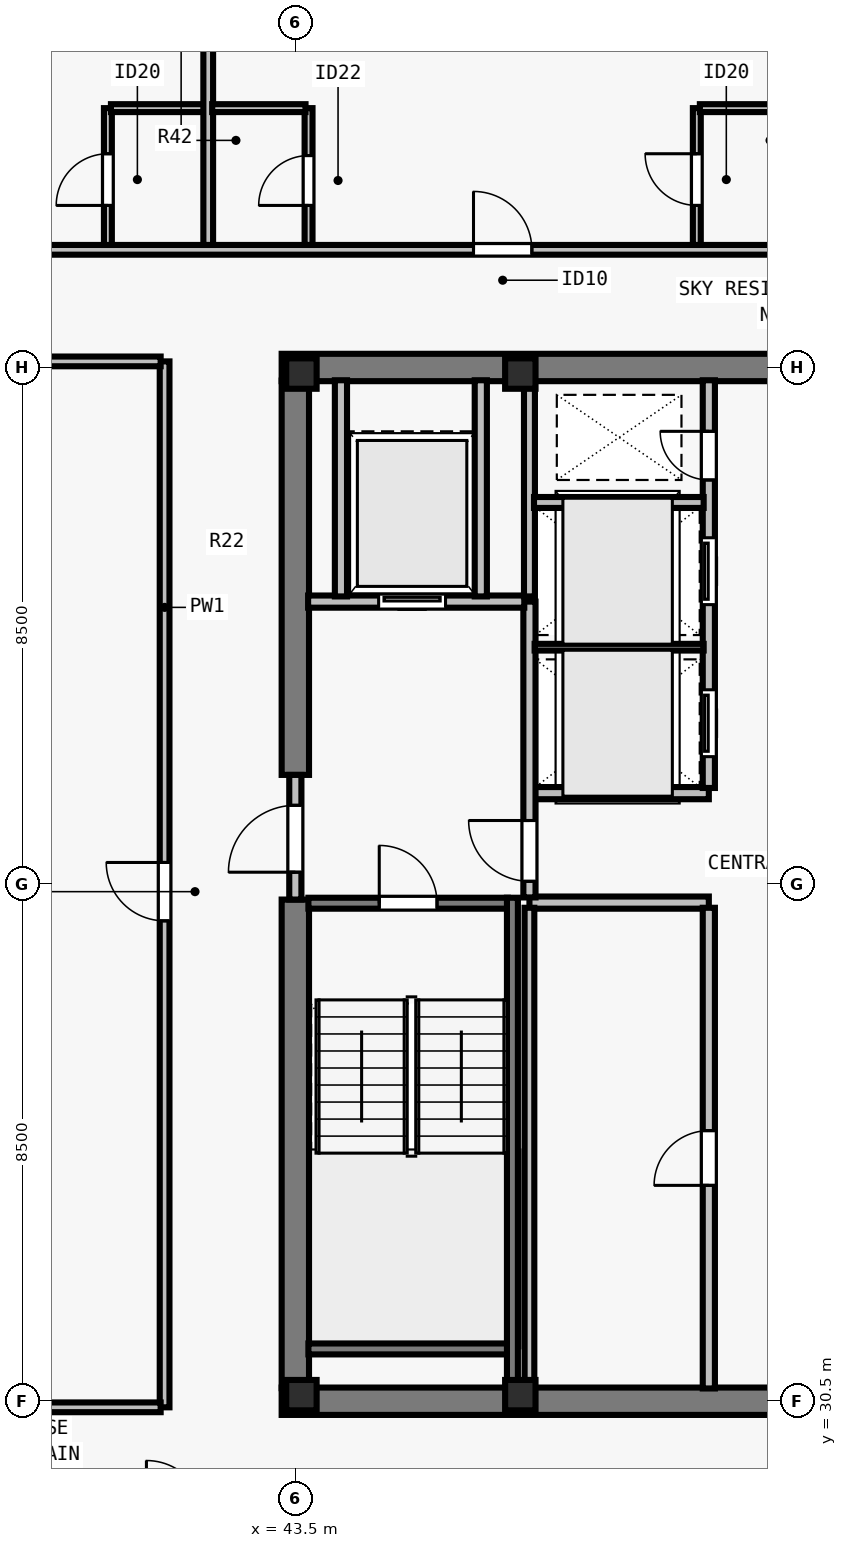
"""IFC4 building model, lengths in metres.
Left out: names, types, materials, properties, quantities, classifications, styles, units other than length and angle.
Written with IfcOpenShell. Run it as: python <this file> out.ifc"""

import sys

from ifc_helpers import new_model, si_unit, direction, frame, frame_2d, origin, origin_2d, place, context, subcontext, project, spatial, rectangle, i_section, extrude, element, fill, save


model = new_model("IFC4")
c1 = context("Model", 3, precision=1e-05, world=origin(), true_north=direction((0.0, 1.0)))
c2 = subcontext(c1, "Body", "Model", "MODEL_VIEW")
j1 = project(units=[si_unit("LENGTHUNIT", "METRE"), si_unit("PLANEANGLEUNIT", "RADIAN")], contexts=[c1])
p1 = place(None, origin())
s1 = spatial("IfcSite", under=j1, at=p1, CompositionType="ELEMENT")
p2 = place(p1, origin())
s2 = spatial("IfcBuilding", under=s1, at=p2, CompositionType="ELEMENT")
p3 = place(p2, frame((0.0, 0.0, 305.0)))
s3 = spatial("IfcBuildingStorey", under=s2, at=p3, CompositionType="ELEMENT", Elevation=305.0)
for number, where, z_axis, x_axis in (
    (1, (43.6, 30.6, 0.0), (0.0, 0.0, 1.0), (1.0, 0.0, 0.0)),
    (2, (47.2, 30.6, 0.0), (0.0, 0.0, 1.0), (1.0, 0.0, 0.0)),
    (3, (43.6, 47.4, 0.0), (0.0, 0.0, 1.0), (1.0, 0.0, 0.0)),
    (4, (47.2, 47.4, 0.0), (0.0, 0.0, 1.0), (1.0, 0.0, 0.0)),
):
    element("IfcColumn", number, at=place(p3, frame(where, z_axis=z_axis, x_axis=x_axis)), inside=s3, PredefinedType="COLUMN", context=c2, shape_type="SweptSolid", body=[
        extrude(i_section(OverallWidth=0.5, OverallDepth=0.5, WebThickness=0.028, FlangeThickness=0.045, at=origin_2d()), origin(), (0.0, 0.0, 1.0), 3.5),
    ])
for number, where, z_axis, x_axis in (
    (5, (43.275, 30.5, 0.0), (0.0, 0.0, 1.0), (1.0, 0.0, 0.0)),
    (6, (43.275, 47.5, 0.0), (0.0, 0.0, 1.0), (1.0, 0.0, 0.0)),
):
    element("IfcWall", number, at=place(p3, frame(where, z_axis=z_axis, x_axis=x_axis)), inside=s3, PredefinedType="SHEAR", context=c2, shape_type="SweptSolid", body=[
        extrude(rectangle(XDim=17.45, YDim=0.45, at=frame_2d((8.725, 0.0))), origin(), (0.0, 0.0, 1.0), 3.29),
    ])
p4 = place(p3, frame((43.5, 30.715, 0.0), z_axis=(0.0, 0.0, 1.0), x_axis=(0.0, 1.0, 0.0)))
e7 = element("IfcWall", 7, at=p4, inside=s3, PredefinedType="SHEAR", context=c2, shape_type="SweptSolid", body=[
    extrude(rectangle(XDim=8.035, YDim=0.45, at=frame_2d((4.018, 0.0))), origin(), (0.0, 0.0, 1.0), 3.29),
])
p5 = place(p3, frame((43.5, 40.8, 0.0), z_axis=(0.0, 0.0, 1.0), x_axis=(0.0, 1.0, 0.0)))
e8 = element("IfcWall", 8, at=p5, inside=s3, PredefinedType="SHEAR", context=c2, shape_type="SweptSolid", body=[
    extrude(rectangle(XDim=6.485, YDim=0.45, at=frame_2d((3.242, 0.0))), origin(), (0.0, 0.0, 1.0), 3.29),
])
for number, where, z_axis, x_axis in (
    (9, (47.35, 38.7, 0.0), (0.0, 0.0, 1.0), (1.0, 0.0, 0.0)),
    (10, (47.35, 40.5, 0.0), (0.0, 0.0, 1.0), (1.0, 0.0, 0.0)),
):
    element("IfcWall", number, at=place(p3, frame(where, z_axis=z_axis, x_axis=x_axis)), inside=s3, PredefinedType="SOLIDWALL", context=c2, shape_type="SweptSolid", body=[
        extrude(rectangle(XDim=2.95, YDim=0.2, at=frame_2d((1.475, 0.0))), origin(), (0.0, 0.0, 1.0), 3.29),
    ])
p6 = place(p3, frame((50.3, 30.71, 0.0), z_axis=(0.0, 0.0, 1.0), x_axis=(0.0, 1.0, 0.0)))
e11 = element("IfcWall", 11, at=p6, inside=s3, PredefinedType="SOLIDWALL", context=c2, shape_type="SweptSolid", body=[
    extrude(rectangle(XDim=7.905, YDim=0.2, at=frame_2d((3.953, 0.0))), origin(), (0.0, 0.0, 1.0), 3.29),
])
p7 = place(p6, frame((3.34, 0.0, 0.0)))
e12 = element("IfcOpeningElement", 12, at=p7, cuts=e11, PredefinedType="OPENING", context=c2, shape_type="SweptSolid", body=[
    extrude(rectangle(XDim=0.9, YDim=2.12, at=frame_2d((0.45, 1.06))), frame((0.0, 0.11, 0.0), z_axis=(0.0, -1.0, 0.0), x_axis=(1.0, 0.0, 0.0)), (0.0, 0.0, 1.0), 0.22),
])
p8 = place(p3, frame((50.3, 40.585, 0.0), z_axis=(0.0, 0.0, 1.0), x_axis=(0.0, 1.0, 0.0)))
e13 = element("IfcWall", 13, at=p8, inside=s3, PredefinedType="SOLIDWALL", context=c2, shape_type="SweptSolid", body=[
    extrude(rectangle(XDim=6.705, YDim=0.2, at=frame_2d((3.353, 0.0))), origin(), (0.0, 0.0, 1.0), 3.29),
])
p9 = place(p8, frame((0.515, 0.0, 0.0)))
e14 = element("IfcOpeningElement", 14, at=p9, cuts=e13, PredefinedType="OPENING", context=c2, shape_type="SweptSolid", body=[
    extrude(rectangle(XDim=1.1, YDim=2.2, at=frame_2d((0.55, 1.1))), frame((0.0, 0.11, 0.0), z_axis=(0.0, -1.0, 0.0), x_axis=(1.0, 0.0, 0.0)), (0.0, 0.0, 1.0), 0.22),
])
p10 = place(p8, frame((3.015, 0.0, 0.0)))
e15 = element("IfcOpeningElement", 15, at=p10, cuts=e13, PredefinedType="OPENING", context=c2, shape_type="SweptSolid", body=[
    extrude(rectangle(XDim=1.1, YDim=2.2, at=frame_2d((0.55, 1.1))), frame((0.0, 0.11, 0.0), z_axis=(0.0, -1.0, 0.0), x_axis=(1.0, 0.0, 0.0)), (0.0, 0.0, 1.0), 0.22),
])
p11 = place(p8, frame((5.065, 0.0, 0.0)))
e16 = element("IfcOpeningElement", 16, at=p11, cuts=e13, PredefinedType="OPENING", context=c2, shape_type="SweptSolid", body=[
    extrude(rectangle(XDim=0.8, YDim=2.08, at=frame_2d((0.4, 1.04))), frame((0.0, 0.11, 0.0), z_axis=(0.0, -1.0, 0.0), x_axis=(1.0, 0.0, 0.0)), (0.0, 0.0, 1.0), 0.22),
])
p12 = place(p3, frame((43.5, 38.75, 0.0), z_axis=(0.0, 0.0, 1.0), x_axis=(0.0, 1.0, 0.0)))
e17 = element("IfcWall", 17, at=p12, inside=s3, PredefinedType="SOLIDWALL", context=c2, shape_type="SweptSolid", body=[
    extrude(rectangle(XDim=2.05, YDim=0.2, at=frame_2d((1.025, 0.0))), origin(), (0.0, 0.0, 1.0), 3.29),
])
p13 = place(p12, frame((0.45, 0.0, 0.0)))
e18 = element("IfcOpeningElement", 18, at=p13, cuts=e17, PredefinedType="OPENING", context=c2, shape_type="SweptSolid", body=[
    extrude(rectangle(XDim=1.1, YDim=2.15, at=frame_2d((0.55, 1.075))), frame((0.0, 0.11, 0.0), z_axis=(0.0, -1.0, 0.0), x_axis=(1.0, 0.0, 0.0)), (0.0, 0.0, 1.0), 0.22),
])
p14 = place(p3, frame((47.35, 38.785, 0.0), z_axis=(0.0, 0.0, 1.0), x_axis=(0.0, 1.0, 0.0)))
e19 = element("IfcWall", 19, at=p14, inside=s3, PredefinedType="SOLIDWALL", context=c2, shape_type="SweptSolid", body=[
    extrude(rectangle(XDim=4.865, YDim=0.2, at=frame_2d((2.433, 0.0))), origin(), (0.0, 0.0, 1.0), 3.29),
])
p15 = place(p14, frame((0.265, 0.0, 0.0)))
e20 = element("IfcOpeningElement", 20, at=p15, cuts=e19, PredefinedType="OPENING", context=c2, shape_type="SweptSolid", body=[
    extrude(rectangle(XDim=1.0, YDim=2.15, at=frame_2d((0.5, 1.075))), frame((0.0, 0.11, 0.0), z_axis=(0.0, -1.0, 0.0), x_axis=(1.0, 0.0, 0.0)), (0.0, 0.0, 1.0), 0.22),
])
p16 = place(p3, frame((43.71, 43.65, 0.0), z_axis=(0.0, 0.0, 1.0), x_axis=(1.0, 0.0, 0.0)))
e21 = element("IfcWall", 21, at=p16, inside=s3, PredefinedType="SOLIDWALL", context=c2, shape_type="SweptSolid", body=[
    extrude(rectangle(XDim=3.555, YDim=0.2, at=frame_2d((1.777, 0.0))), origin(), (0.0, 0.0, 1.0), 3.29),
])
p17 = place(p16, frame((1.16, 0.0, 0.0)))
e22 = element("IfcOpeningElement", 22, at=p17, cuts=e21, PredefinedType="OPENING", context=c2, shape_type="SweptSolid", body=[
    extrude(rectangle(XDim=1.1, YDim=2.2, at=frame_2d((0.55, 1.1))), frame((0.0, 0.11, 0.0), z_axis=(0.0, -1.0, 0.0), x_axis=(1.0, 0.0, 0.0)), (0.0, 0.0, 1.0), 0.22),
])
for number, where, z_axis, x_axis in (
    (23, (46.55, 43.735, 0.0), (0.0, 0.0, 1.0), (0.0, 1.0, 0.0)),
    (24, (44.25, 43.735, 0.0), (0.0, 0.0, 1.0), (0.0, 1.0, 0.0)),
):
    element("IfcWall", number, at=place(p3, frame(where, z_axis=z_axis, x_axis=x_axis)), inside=s3, PredefinedType="SOLIDWALL", context=c2, shape_type="SweptSolid", body=[
        extrude(rectangle(XDim=3.555, YDim=0.2, at=frame_2d((1.777, 0.0))), origin(), (0.0, 0.0, 1.0), 3.29),
    ])
p18 = place(p3, frame((47.35, 30.71, 0.0), z_axis=(0.0, 0.0, 1.0), x_axis=(0.0, 1.0, 0.0)))
e25 = element("IfcWall", 25, at=p18, inside=s3, PredefinedType="PARTITIONING", context=c2, shape_type="SweptSolid", body=[
    extrude(rectangle(XDim=7.905, YDim=0.16, at=frame_2d((3.953, 0.0))), origin(), (0.0, 0.0, 1.0), 3.29),
])
p19 = place(p3, frame((47.35, 43.735, 0.0), z_axis=(0.0, 0.0, 1.0), x_axis=(0.0, 1.0, 0.0)))
e26 = element("IfcWall", 26, at=p19, inside=s3, PredefinedType="SOLIDWALL", context=c2, shape_type="SweptSolid", body=[
    extrude(rectangle(XDim=3.555, YDim=0.18, at=frame_2d((1.777, 0.0))), origin(), (0.0, 0.0, 1.0), 3.29),
])
p20 = place(p3, frame((47.435, 42.9, 0.0), z_axis=(0.0, 0.0, 1.0), x_axis=(1.0, 0.0, 0.0)))
e27 = element("IfcWall", 27, at=p20, inside=s3, PredefinedType="PARTITIONING", context=c2, shape_type="SweptSolid", body=[
    extrude(rectangle(XDim=2.78, YDim=0.11, at=frame_2d((1.39, 0.0))), origin(), (0.0, 0.0, 1.0), 3.29),
])
p21 = place(p3, frame((47.425, 45.28, 0.0), z_axis=(0.0, 0.0, 1.0), x_axis=(1.0, 0.0, 0.0)))
e28 = element("IfcWall", 28, at=p21, inside=s3, PredefinedType="SOLIDWALL", context=c2, shape_type="SweptSolid", body=[
    extrude(rectangle(XDim=2.79, YDim=0.18, at=frame_2d((1.395, 0.0))), origin(), (0.0, 0.0, 1.0), 3.29),
])
p22 = place(p3, frame((31.285, 49.435, 0.0), z_axis=(0.0, 0.0, 1.0), x_axis=(1.0, 0.0, 0.0)))
e29 = element("IfcWall", 29, at=p22, inside=s3, PredefinedType="PARTITIONING", context=c2, shape_type="SweptSolid", body=[
    extrude(rectangle(XDim=41.43, YDim=0.16, at=frame_2d((20.715, 0.0))), origin(), (0.0, 0.0, 1.0), 3.009),
])
p23 = place(p22, frame((4.979, 0.0, 0.0)))
e30 = element("IfcOpeningElement", 30, at=p23, cuts=e29, PredefinedType="OPENING", context=c2, shape_type="SweptSolid", body=[
    extrude(rectangle(XDim=0.96, YDim=2.18, at=frame_2d((0.48, 1.09))), frame((0.0, 0.09, 0.0), z_axis=(0.0, -1.0, 0.0), x_axis=(1.0, 0.0, 0.0)), (0.0, 0.0, 1.0), 0.18),
])
p24 = place(p22, frame((15.145, 0.0, 0.0)))
e31 = element("IfcOpeningElement", 31, at=p24, cuts=e29, PredefinedType="OPENING", context=c2, shape_type="SweptSolid", body=[
    extrude(rectangle(XDim=0.96, YDim=2.18, at=frame_2d((0.48, 1.09))), frame((0.0, 0.09, 0.0), z_axis=(0.0, -1.0, 0.0), x_axis=(1.0, 0.0, 0.0)), (0.0, 0.0, 1.0), 0.18),
])
p25 = place(p22, frame((25.435, 0.0, 0.0)))
e32 = element("IfcOpeningElement", 32, at=p25, cuts=e29, PredefinedType="OPENING", context=c2, shape_type="SweptSolid", body=[
    extrude(rectangle(XDim=0.96, YDim=2.18, at=frame_2d((0.48, 1.09))), frame((0.0, 0.09, 0.0), z_axis=(0.0, -1.0, 0.0), x_axis=(1.0, 0.0, 0.0)), (0.0, 0.0, 1.0), 0.18),
])
p26 = place(p22, frame((35.849, 0.0, 0.0)))
e33 = element("IfcOpeningElement", 33, at=p26, cuts=e29, PredefinedType="OPENING", context=c2, shape_type="SweptSolid", body=[
    extrude(rectangle(XDim=0.96, YDim=2.18, at=frame_2d((0.48, 1.09))), frame((0.0, 0.09, 0.0), z_axis=(0.0, -1.0, 0.0), x_axis=(1.0, 0.0, 0.0)), (0.0, 0.0, 1.0), 0.18),
])
p27 = place(p3, frame((41.35, 30.4, 0.0), z_axis=(0.0, 0.0, 1.0), x_axis=(0.0, 1.0, 0.0)))
e34 = element("IfcWall", 34, at=p27, inside=s3, PredefinedType="PARTITIONING", context=c2, shape_type="SweptSolid", body=[
    extrude(rectangle(XDim=17.2, YDim=0.16, at=frame_2d((8.6, 0.0))), origin(), (0.0, 0.0, 1.0), 3.009),
])
p28 = place(p27, frame((8.0, 0.0, 0.0)))
e35 = element("IfcOpeningElement", 35, at=p28, cuts=e34, PredefinedType="OPENING", context=c2, shape_type="SweptSolid", body=[
    extrude(rectangle(XDim=0.96, YDim=2.12, at=frame_2d((0.48, 1.06))), frame((0.0, 0.09, 0.0), z_axis=(0.0, -1.0, 0.0), x_axis=(1.0, 0.0, 0.0)), (0.0, 0.0, 1.0), 0.18),
])
for number, where, z_axis, x_axis in (
    (36, (31.285, 30.4, 0.0), (0.0, 0.0, 1.0), (1.0, 0.0, 0.0)),
    (37, (31.285, 47.6, 0.0), (0.0, 0.0, 1.0), (1.0, 0.0, 0.0)),
):
    element("IfcWall", number, at=place(p3, frame(where, z_axis=z_axis, x_axis=x_axis)), inside=s3, PredefinedType="PARTITIONING", context=c2, shape_type="SweptSolid", body=[
        extrude(rectangle(XDim=10.0, YDim=0.16, at=frame_2d((5.0, 0.0))), origin(), (0.0, 0.0, 1.0), 3.29),
    ])
p29 = place(p3, frame((40.417, 49.515, 0.0), z_axis=(0.0, 0.0, 1.0), x_axis=(0.0, 1.0, 0.0)))
e38 = element("IfcWall", 38, at=p29, inside=s3, PredefinedType="PLUMBINGWALL", context=c2, shape_type="SweptSolid", body=[
    extrude(rectangle(XDim=2.25, YDim=0.13, at=frame_2d((1.125, 0.0))), origin(), (0.0, 0.0, 1.0), 3.29),
])
p30 = place(p29, frame((0.65, 0.0, 0.0)))
e39 = element("IfcOpeningElement", 39, at=p30, cuts=e38, PredefinedType="OPENING", context=c2, shape_type="SweptSolid", body=[
    extrude(rectangle(XDim=0.85, YDim=2.1, at=frame_2d((0.425, 1.05))), frame((0.0, 0.075, 0.0), z_axis=(0.0, -1.0, 0.0), x_axis=(1.0, 0.0, 0.0)), (0.0, 0.0, 1.0), 0.15),
])
p31 = place(p3, frame((40.468, 51.765, 0.0), z_axis=(0.0, 0.0, 1.0), x_axis=(1.0, 0.0, 0.0)))
e40 = element("IfcWall", 40, at=p31, inside=s3, PredefinedType="PLUMBINGWALL", context=c2, shape_type="SweptSolid", body=[
    extrude(rectangle(XDim=1.6, YDim=0.13, at=frame_2d((0.8, 0.0))), origin(), (0.0, 0.0, 1.0), 3.29),
])
p32 = place(p3, frame((42.067, 49.515, 0.0), z_axis=(0.0, 0.0, 1.0), x_axis=(0.0, 1.0, 0.0)))
e41 = element("IfcWall", 41, at=p32, inside=s3, PredefinedType="PARTITIONING", context=c2, shape_type="SweptSolid", body=[
    extrude(rectangle(XDim=10.185, YDim=0.16, at=frame_2d((5.093, 0.0))), origin(), (0.0, 0.0, 1.0), 2.653),
])
p33 = place(p3, frame((43.718, 49.515, 0.0), z_axis=(0.0, 0.0, 1.0), x_axis=(0.0, 1.0, 0.0)))
e42 = element("IfcWall", 42, at=p33, inside=s3, PredefinedType="PLUMBINGWALL", context=c2, shape_type="SweptSolid", body=[
    extrude(rectangle(XDim=2.25, YDim=0.13, at=frame_2d((1.125, 0.0))), origin(), (0.0, 0.0, 1.0), 3.29),
])
p34 = place(p33, frame((0.65, 0.0, 0.0)))
e43 = element("IfcOpeningElement", 43, at=p34, cuts=e42, PredefinedType="OPENING", context=c2, shape_type="SweptSolid", body=[
    extrude(rectangle(XDim=0.82, YDim=2.1, at=frame_2d((0.41, 1.05))), frame((0.0, 0.075, 0.0), z_axis=(0.0, -1.0, 0.0), x_axis=(1.0, 0.0, 0.0)), (0.0, 0.0, 1.0), 0.15),
])
p35 = place(p3, frame((42.133, 51.765, 0.0), z_axis=(0.0, 0.0, 1.0), x_axis=(1.0, 0.0, 0.0)))
e44 = element("IfcWall", 44, at=p35, inside=s3, PredefinedType="PLUMBINGWALL", context=c2, shape_type="SweptSolid", body=[
    extrude(rectangle(XDim=1.535, YDim=0.13, at=frame_2d((0.768, 0.0))), origin(), (0.0, 0.0, 1.0), 3.29),
])
p36 = place(p3, frame((50.103, 49.515, 0.0), z_axis=(0.0, 0.0, 1.0), x_axis=(0.0, 1.0, 0.0)))
e45 = element("IfcWall", 45, at=p36, inside=s3, PredefinedType="PLUMBINGWALL", context=c2, shape_type="SweptSolid", body=[
    extrude(rectangle(XDim=2.25, YDim=0.13, at=frame_2d((1.125, 0.0))), origin(), (0.0, 0.0, 1.0), 3.009),
])
p37 = place(p36, frame((0.65, 0.0, 0.0)))
e46 = element("IfcOpeningElement", 46, at=p37, cuts=e45, PredefinedType="OPENING", context=c2, shape_type="SweptSolid", body=[
    extrude(rectangle(XDim=0.85, YDim=2.1, at=frame_2d((0.425, 1.05))), frame((0.0, 0.075, 0.0), z_axis=(0.0, -1.0, 0.0), x_axis=(1.0, 0.0, 0.0)), (0.0, 0.0, 1.0), 0.15),
])
p38 = place(p3, frame((50.153, 51.765, 0.0), z_axis=(0.0, 0.0, 1.0), x_axis=(1.0, 0.0, 0.0)))
e47 = element("IfcWall", 47, at=p38, inside=s3, PredefinedType="PLUMBINGWALL", context=c2, shape_type="SweptSolid", body=[
    extrude(rectangle(XDim=1.6, YDim=0.13, at=frame_2d((0.8, 0.0))), origin(), (0.0, 0.0, 1.0), 3.29),
])
p39 = place(p3, frame((43.715, 38.69, 0.0), z_axis=(0.0, 0.0, 1.0), x_axis=(1.0, 0.0, 0.0)))
e48 = element("IfcWall", 48, at=p39, inside=s3, PredefinedType="SOLIDWALL", context=c2, shape_type="SweptSolid", body=[
    extrude(rectangle(XDim=3.28, YDim=0.18, at=frame_2d((1.64, 0.0))), origin(), (0.0, 0.0, 1.0), 3.29),
])
p40 = place(p39, frame((1.165, 0.0, 0.0)))
e49 = element("IfcOpeningElement", 49, at=p40, cuts=e48, PredefinedType="OPENING", context=c2, shape_type="SweptSolid", body=[
    extrude(rectangle(XDim=0.95, YDim=2.15, at=frame_2d((0.475, 1.075))), frame((0.0, 0.1, 0.0), z_axis=(0.0, -1.0, 0.0), x_axis=(1.0, 0.0, 0.0)), (0.0, 0.0, 1.0), 0.2),
])
p41 = place(p3, frame((43.715, 31.36, 0.0), z_axis=(0.0, 0.0, 1.0), x_axis=(1.0, 0.0, 0.0)))
e50 = element("IfcWall", 50, at=p41, inside=s3, PredefinedType="SOLIDWALL", context=c2, shape_type="SweptSolid", body=[
    extrude(rectangle(XDim=3.28, YDim=0.18, at=frame_2d((1.64, 0.0))), origin(), (0.0, 0.0, 1.0), 3.29),
])
p42 = place(p3, frame((47.07, 38.78, 0.0), z_axis=(0.0, 0.0, 1.0), x_axis=(0.0, -1.0, 0.0)))
e51 = element("IfcWall", 51, at=p42, inside=s3, PredefinedType="SOLIDWALL", context=c2, shape_type="SweptSolid", body=[
    extrude(rectangle(XDim=8.067, YDim=0.18, at=frame_2d((4.034, 0.0))), origin(), (0.0, 0.0, 1.0), 3.29),
])
p43 = place(p13, origin())
e52 = element("IfcDoor", 52, at=p43, inside=s3, OperationType="SINGLE_SWING_LEFT", PredefinedType="DOOR", context=c2, shape_type="SweptSolid", body=[
    extrude(rectangle(XDim=1.1, YDim=2.15, at=frame_2d((0.55, 1.075))), frame((0.0, 0.025, 0.0), z_axis=(0.0, -1.0, 0.0), x_axis=(1.0, 0.0, 0.0)), (0.0, 0.0, 1.0), 0.05),
])
fill(e18, e52)
p44 = place(p15, origin())
e53 = element("IfcDoor", 53, at=p44, inside=s3, OperationType="SINGLE_SWING_RIGHT", PredefinedType="DOOR", context=c2, shape_type="SweptSolid", body=[
    extrude(rectangle(XDim=1.0, YDim=2.15, at=frame_2d((0.5, 1.075))), frame((0.0, 0.025, 0.0), z_axis=(0.0, -1.0, 0.0), x_axis=(1.0, 0.0, 0.0)), (0.0, 0.0, 1.0), 0.05),
])
fill(e20, e53)
p45 = place(p17, origin())
e54 = element("IfcDoor", 54, at=p45, inside=s3, OperationType="SLIDING_TO_LEFT", PredefinedType="DOOR", context=c2, shape_type="SweptSolid", body=[
    extrude(rectangle(XDim=1.1, YDim=2.2, at=frame_2d((0.55, 1.1))), frame((0.0, 0.025, 0.0), z_axis=(0.0, -1.0, 0.0), x_axis=(1.0, 0.0, 0.0)), (0.0, 0.0, 1.0), 0.05),
])
fill(e22, e54)
p46 = place(p7, origin())
e55 = element("IfcDoor", 55, at=p46, inside=s3, OperationType="SINGLE_SWING_LEFT", PredefinedType="DOOR", context=c2, shape_type="SweptSolid", body=[
    extrude(rectangle(XDim=0.9, YDim=2.12, at=frame_2d((0.45, 1.06))), frame((0.0, 0.025, 0.0), z_axis=(0.0, -1.0, 0.0), x_axis=(1.0, 0.0, 0.0)), (0.0, 0.0, 1.0), 0.05),
])
fill(e12, e55)
p47 = place(p9, origin())
e56 = element("IfcDoor", 56, at=p47, inside=s3, OperationType="SLIDING_TO_LEFT", PredefinedType="DOOR", context=c2, shape_type="SweptSolid", body=[
    extrude(rectangle(XDim=1.1, YDim=2.2, at=frame_2d((0.55, 1.1))), frame((0.0, 0.025, 0.0), z_axis=(0.0, -1.0, 0.0), x_axis=(1.0, 0.0, 0.0)), (0.0, 0.0, 1.0), 0.05),
])
fill(e14, e56)
p48 = place(p10, origin())
e57 = element("IfcDoor", 57, at=p48, inside=s3, OperationType="SLIDING_TO_LEFT", PredefinedType="DOOR", context=c2, shape_type="SweptSolid", body=[
    extrude(rectangle(XDim=1.1, YDim=2.2, at=frame_2d((0.55, 1.1))), frame((0.0, 0.025, 0.0), z_axis=(0.0, -1.0, 0.0), x_axis=(1.0, 0.0, 0.0)), (0.0, 0.0, 1.0), 0.05),
])
fill(e15, e57)
p49 = place(p11, origin())
e58 = element("IfcDoor", 58, at=p49, inside=s3, OperationType="SINGLE_SWING_RIGHT", PredefinedType="DOOR", context=c2, shape_type="SweptSolid", body=[
    extrude(rectangle(XDim=0.8, YDim=2.08, at=frame_2d((0.4, 1.04))), frame((0.0, 0.025, 0.0), z_axis=(0.0, -1.0, 0.0), x_axis=(1.0, 0.0, 0.0)), (0.0, 0.0, 1.0), 0.05),
])
fill(e16, e58)
p50 = place(p30, origin())
e59 = element("IfcDoor", 59, at=p50, inside=s3, OperationType="SINGLE_SWING_LEFT", PredefinedType="DOOR", context=c2, shape_type="SweptSolid", body=[
    extrude(rectangle(XDim=0.85, YDim=2.1, at=frame_2d((0.425, 1.05))), frame((0.0, 0.025, 0.0), z_axis=(0.0, -1.0, 0.0), x_axis=(1.0, 0.0, 0.0)), (0.0, 0.0, 1.0), 0.05),
])
fill(e39, e59)
p51 = place(p34, origin())
e60 = element("IfcDoor", 60, at=p51, inside=s3, OperationType="SINGLE_SWING_LEFT", PredefinedType="DOOR", context=c2, shape_type="SweptSolid", body=[
    extrude(rectangle(XDim=0.82, YDim=2.1, at=frame_2d((0.41, 1.05))), frame((0.0, 0.025, 0.0), z_axis=(0.0, -1.0, 0.0), x_axis=(1.0, 0.0, 0.0)), (0.0, 0.0, 1.0), 0.05),
])
fill(e43, e60)
p52 = place(p37, origin())
e61 = element("IfcDoor", 61, at=p52, inside=s3, OperationType="SINGLE_SWING_RIGHT", PredefinedType="DOOR", context=c2, shape_type="SweptSolid", body=[
    extrude(rectangle(XDim=0.85, YDim=2.1, at=frame_2d((0.425, 1.05))), frame((0.0, 0.025, 0.0), z_axis=(0.0, -1.0, 0.0), x_axis=(1.0, 0.0, 0.0)), (0.0, 0.0, 1.0), 0.05),
])
fill(e46, e61)
p53 = place(p24, origin())
e62 = element("IfcDoor", 62, at=p53, inside=s3, OperationType="SINGLE_SWING_LEFT", PredefinedType="DOOR", context=c2, shape_type="SweptSolid", body=[
    extrude(rectangle(XDim=0.96, YDim=2.18, at=frame_2d((0.48, 1.09))), frame((0.0, 0.025, 0.0), z_axis=(0.0, -1.0, 0.0), x_axis=(1.0, 0.0, 0.0)), (0.0, 0.0, 1.0), 0.05),
])
fill(e31, e62)
p54 = place(p28, origin())
e63 = element("IfcDoor", 63, at=p54, inside=s3, OperationType="SINGLE_SWING_RIGHT", PredefinedType="DOOR", context=c2, shape_type="SweptSolid", body=[
    extrude(rectangle(XDim=0.96, YDim=2.12, at=frame_2d((0.48, 1.06))), frame((0.0, 0.025, 0.0), z_axis=(0.0, -1.0, 0.0), x_axis=(1.0, 0.0, 0.0)), (0.0, 0.0, 1.0), 0.05),
])
fill(e35, e63)
p55 = place(p40, origin())
e64 = element("IfcDoor", 64, at=p55, inside=s3, OperationType="SINGLE_SWING_LEFT", PredefinedType="DOOR", context=c2, shape_type="SweptSolid", body=[
    extrude(rectangle(XDim=0.95, YDim=2.15, at=frame_2d((0.475, 1.075))), frame((0.0, 0.025, 0.0), z_axis=(0.0, -1.0, 0.0), x_axis=(1.0, 0.0, 0.0)), (0.0, 0.0, 1.0), 0.05),
])
fill(e49, e64)
save(model, sys.argv[1])
